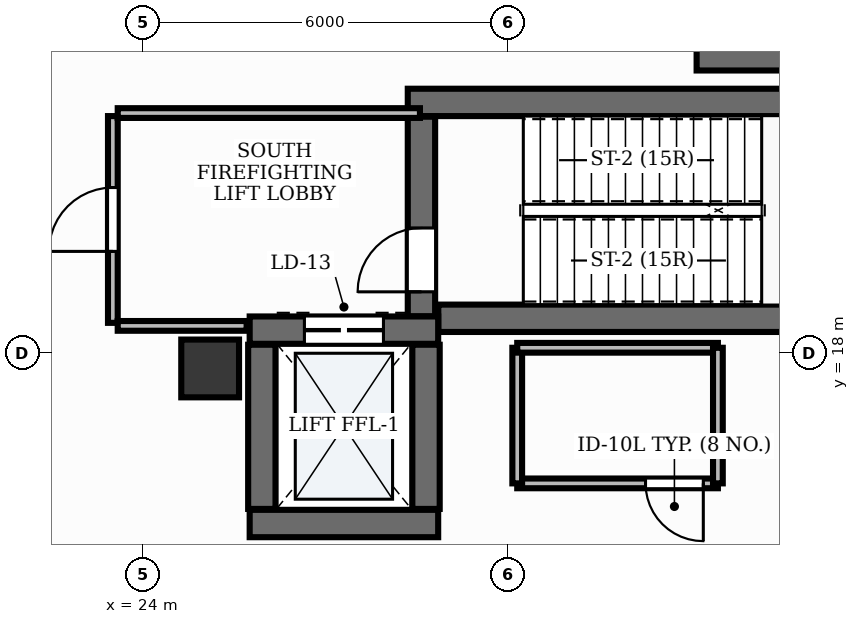
"""IFC4 building model, lengths in metres.
Left out: names, types, materials, properties, quantities, classifications, styles, units other than length and angle.
Written with IfcOpenShell. Run it as: python <this file> out.ifc"""

import sys

from ifc_helpers import new_model, si_unit, direction, frame, frame_2d, origin, origin_2d, place, context, subcontext, project, spatial, rectangle, extrude, element, fill, save


model = new_model("IFC4")
c1 = context("Model", 3, precision=1e-05, world=origin(), true_north=direction((0.0, 1.0)))
c2 = subcontext(c1, "Body", "Model", "MODEL_VIEW")
j1 = project(units=[si_unit("LENGTHUNIT", "METRE"), si_unit("PLANEANGLEUNIT", "RADIAN")], contexts=[c1])
p1 = place(None, origin())
s1 = spatial("IfcSite", under=j1, at=p1, CompositionType="ELEMENT")
p2 = place(p1, origin())
s2 = spatial("IfcBuilding", under=s1, at=p2, CompositionType="ELEMENT")
p3 = place(p2, frame((0.0, 0.0, 20.4)))
s3 = spatial("IfcBuildingStorey", under=s2, at=p3, CompositionType="ELEMENT", Elevation=20.4)
p4 = place(p3, frame((28.852, 18.575, 0.0), z_axis=(0.0, 0.0, 1.0), x_axis=(1.0, 0.0, 0.0)))
e1 = element("IfcWall", 1, at=p4, inside=s3, PredefinedType="SHEAR", context=c2, shape_type="SweptSolid", body=[
    extrude(rectangle(XDim=8.248, YDim=0.45, at=frame_2d((4.124, 0.0))), origin(), (0.0, 0.0, 1.0), 5.1),
])
p5 = place(p3, frame((28.35, 22.125, 0.0), z_axis=(0.0, 0.0, 1.0), x_axis=(1.0, 0.0, 0.0)))
e2 = element("IfcWall", 2, at=p5, inside=s3, PredefinedType="SHEAR", context=c2, shape_type="SweptSolid", body=[
    extrude(rectangle(XDim=8.75, YDim=0.45, at=frame_2d((4.375, 0.0))), origin(), (0.0, 0.0, 1.0), 5.1),
])
p6 = place(p3, frame((28.575, 18.607, 0.0), z_axis=(0.0, 0.0, 1.0), x_axis=(0.0, 1.0, 0.0)))
e3 = element("IfcWall", 3, at=p6, inside=s3, PredefinedType="SHEAR", context=c2, shape_type="SweptSolid", body=[
    extrude(rectangle(XDim=3.283, YDim=0.45, at=frame_2d((1.642, 0.0))), origin(), (0.0, 0.0, 1.0), 5.1),
])
p7 = place(p6, frame((0.403, 0.0, 0.0)))
e4 = element("IfcOpeningElement", 4, at=p7, cuts=e3, PredefinedType="OPENING", context=c2, shape_type="SweptSolid", body=[
    extrude(rectangle(XDim=1.05, YDim=2.15, at=frame_2d((0.525, 1.075))), frame((0.0, 0.24, 0.0), z_axis=(0.0, -1.0, 0.0), x_axis=(1.0, 0.0, 0.0)), (0.0, 0.0, 1.0), 0.48),
])
p8 = place(p3, frame((33.1, 22.875, 0.0), z_axis=(0.0, 0.0, 1.0), x_axis=(1.0, 0.0, 0.0)))
e5 = element("IfcWall", 5, at=p8, inside=s3, PredefinedType="SHEAR", context=c2, shape_type="SweptSolid", body=[
    extrude(rectangle(XDim=4.0, YDim=0.45, at=frame_2d((2.0, 0.0))), origin(), (0.0, 0.0, 1.0), 5.1),
])
p9 = place(p3, frame((25.75, 15.2, 0.0), z_axis=(0.0, 0.0, 1.0), x_axis=(1.0, 0.0, 0.0)))
e6 = element("IfcWall", 6, at=p9, inside=s3, PredefinedType="SHEAR", context=c2, shape_type="SweptSolid", body=[
    extrude(rectangle(XDim=3.1, YDim=0.45, at=frame_2d((1.55, 0.0))), origin(), (0.0, 0.0, 1.0), 5.1),
])
p10 = place(p3, frame((25.75, 18.38, 0.0), z_axis=(0.0, 0.0, 1.0), x_axis=(1.0, 0.0, 0.0)))
e7 = element("IfcWall", 7, at=p10, inside=s3, PredefinedType="SHEAR", context=c2, shape_type="SweptSolid", body=[
    extrude(rectangle(XDim=3.1, YDim=0.45, at=frame_2d((1.55, 0.0))), origin(), (0.0, 0.0, 1.0), 5.1),
])
p11 = place(p10, frame((0.9, 0.0, 0.0)))
e8 = element("IfcOpeningElement", 8, at=p11, cuts=e7, PredefinedType="OPENING", context=c2, shape_type="SweptSolid", body=[
    extrude(rectangle(XDim=1.3, YDim=2.2, at=frame_2d((0.65, 1.1))), frame((0.0, 0.24, 0.0), z_axis=(0.0, -1.0, 0.0), x_axis=(1.0, 0.0, 0.0)), (0.0, 0.0, 1.0), 0.48),
])
for number, where, z_axis, x_axis in (
    (9, (25.95, 15.44, 0.0), (0.0, 0.0, 1.0), (0.0, 1.0, 0.0)),
    (10, (28.65, 15.44, 0.0), (0.0, 0.0, 1.0), (0.0, 1.0, 0.0)),
):
    element("IfcWall", number, at=place(p3, frame(where, z_axis=z_axis, x_axis=x_axis)), inside=s3, PredefinedType="SHEAR", context=c2, shape_type="SweptSolid", body=[
        extrude(rectangle(XDim=2.7, YDim=0.45, at=frame_2d((1.35, 0.0))), origin(), (0.0, 0.0, 1.0), 5.1),
    ])
p12 = place(p3, frame((25.1, 17.75, -0.0), z_axis=(0.0, 0.0, 1.0), x_axis=(1.0, 0.0, 0.0)))
e11 = element("IfcColumn", 11, at=p12, inside=s3, PredefinedType="PILASTER", context=c2, shape_type="SweptSolid", body=[
    extrude(rectangle(XDim=0.95, YDim=0.95, at=origin_2d()), origin(), (0.0, 0.0, 1.0), 5.101),
])
p13 = place(p3, frame((23.5, 18.5, 0.0), z_axis=(0.0, 0.0, 1.0), x_axis=(0.0, 1.0, 0.0)))
e12 = element("IfcWall", 12, at=p13, inside=s3, PredefinedType="PARTITIONING", context=c2, shape_type="SweptSolid", body=[
    extrude(rectangle(XDim=3.4, YDim=0.16, at=frame_2d((1.7, 0.0))), origin(), (0.0, 0.0, 1.0), 4.11),
])
p14 = place(p13, frame((1.175, 0.0, 0.0)))
e13 = element("IfcOpeningElement", 13, at=p14, cuts=e12, PredefinedType="OPENING", context=c2, shape_type="SweptSolid", body=[
    extrude(rectangle(XDim=1.05, YDim=2.15, at=frame_2d((0.525, 1.075))), frame((0.0, 0.095, 0.0), z_axis=(0.0, -1.0, 0.0), x_axis=(1.0, 0.0, 0.0)), (0.0, 0.0, 1.0), 0.19),
])
p15 = place(p3, frame((23.58, 21.95, 0.0), z_axis=(0.0, 0.0, 1.0), x_axis=(1.0, 0.0, 0.0)))
e14 = element("IfcWall", 14, at=p15, inside=s3, PredefinedType="PARTITIONING", context=c2, shape_type="SweptSolid", body=[
    extrude(rectangle(XDim=4.97, YDim=0.16, at=frame_2d((2.485, 0.0))), origin(), (0.0, 0.0, 1.0), 4.11),
])
p16 = place(p3, frame((23.58, 18.45, 0.0), z_axis=(0.0, 0.0, 1.0), x_axis=(1.0, 0.0, 0.0)))
e15 = element("IfcWall", 15, at=p16, inside=s3, PredefinedType="PARTITIONING", context=c2, shape_type="SweptSolid", body=[
    extrude(rectangle(XDim=2.12, YDim=0.16, at=frame_2d((1.06, 0.0))), origin(), (0.0, 0.0, 1.0), 4.11),
])
p17 = place(p3, frame((33.45, 15.86, 0.0), z_axis=(0.0, 0.0, 1.0), x_axis=(-1.0, 0.0, 0.0)))
e16 = element("IfcWall", 16, at=p17, inside=s3, PredefinedType="PARTITIONING", context=c2, shape_type="SweptSolid", body=[
    extrude(rectangle(XDim=3.3, YDim=0.16, at=frame_2d((1.65, 0.0))), origin(), (0.0, 0.0, 1.0), 4.11),
])
p18 = place(p17, frame((0.24, 0.0, 0.0)))
e17 = element("IfcOpeningElement", 17, at=p18, cuts=e16, PredefinedType="OPENING", context=c2, shape_type="SweptSolid", body=[
    extrude(rectangle(XDim=0.95, YDim=2.15, at=frame_2d((0.475, 1.075))), frame((0.0, 0.095, 0.0), z_axis=(0.0, -1.0, 0.0), x_axis=(1.0, 0.0, 0.0)), (0.0, 0.0, 1.0), 0.19),
])
p19 = place(p3, frame((30.15, 15.86, 0.0), z_axis=(0.0, 0.0, 1.0), x_axis=(0.0, 1.0, 0.0)))
e18 = element("IfcWall", 18, at=p19, inside=s3, PredefinedType="PARTITIONING", context=c2, shape_type="SweptSolid", body=[
    extrude(rectangle(XDim=2.23, YDim=0.16, at=frame_2d((1.115, 0.0))), origin(), (0.0, 0.0, 1.0), 4.11),
])
p20 = place(p3, frame((30.15, 18.09, 0.0), z_axis=(0.0, 0.0, 1.0), x_axis=(1.0, 0.0, 0.0)))
e19 = element("IfcWall", 19, at=p20, inside=s3, PredefinedType="PARTITIONING", context=c2, shape_type="SweptSolid", body=[
    extrude(rectangle(XDim=3.3, YDim=0.16, at=frame_2d((1.65, 0.0))), origin(), (0.0, 0.0, 1.0), 4.11),
])
p21 = place(p3, frame((33.45, 18.09, 0.0), z_axis=(0.0, 0.0, 1.0), x_axis=(0.0, -1.0, 0.0)))
e20 = element("IfcWall", 20, at=p21, inside=s3, PredefinedType="PARTITIONING", context=c2, shape_type="SweptSolid", body=[
    extrude(rectangle(XDim=2.23, YDim=0.16, at=frame_2d((1.115, 0.0))), origin(), (0.0, 0.0, 1.0), 4.11),
])
p22 = place(p7, origin())
e21 = element("IfcDoor", 21, at=p22, inside=s3, OperationType="SINGLE_SWING_LEFT", PredefinedType="DOOR", context=c2, shape_type="SweptSolid", body=[
    extrude(rectangle(XDim=1.05, YDim=2.15, at=frame_2d((0.525, 1.075))), frame((0.0, 0.025, 0.0), z_axis=(0.0, -1.0, 0.0), x_axis=(1.0, 0.0, 0.0)), (0.0, 0.0, 1.0), 0.05),
])
fill(e4, e21)
p23 = place(p11, origin())
e22 = element("IfcDoor", 22, at=p23, inside=s3, OperationType="DOUBLE_DOOR_SLIDING", PredefinedType="DOOR", context=c2, shape_type="SweptSolid", body=[
    extrude(rectangle(XDim=1.3, YDim=2.2, at=frame_2d((0.65, 1.1))), frame((0.0, 0.025, 0.0), z_axis=(0.0, -1.0, 0.0), x_axis=(1.0, 0.0, 0.0)), (0.0, 0.0, 1.0), 0.05),
])
fill(e8, e22)
p24 = place(p14, origin())
e23 = element("IfcDoor", 23, at=p24, inside=s3, OperationType="SINGLE_SWING_LEFT", PredefinedType="DOOR", context=c2, shape_type="SweptSolid", body=[
    extrude(rectangle(XDim=1.05, YDim=2.15, at=frame_2d((0.525, 1.075))), frame((0.0, 0.025, 0.0), z_axis=(0.0, -1.0, 0.0), x_axis=(1.0, 0.0, 0.0)), (0.0, 0.0, 1.0), 0.05),
])
fill(e13, e23)
p25 = place(p18, origin())
e24 = element("IfcDoor", 24, at=p25, inside=s3, OperationType="SINGLE_SWING_LEFT", PredefinedType="DOOR", context=c2, shape_type="SweptSolid", body=[
    extrude(rectangle(XDim=0.95, YDim=2.15, at=frame_2d((0.475, 1.075))), frame((0.0, 0.025, 0.0), z_axis=(0.0, -1.0, 0.0), x_axis=(1.0, 0.0, 0.0)), (0.0, 0.0, 1.0), 0.05),
])
fill(e17, e24)
save(model, sys.argv[1])
